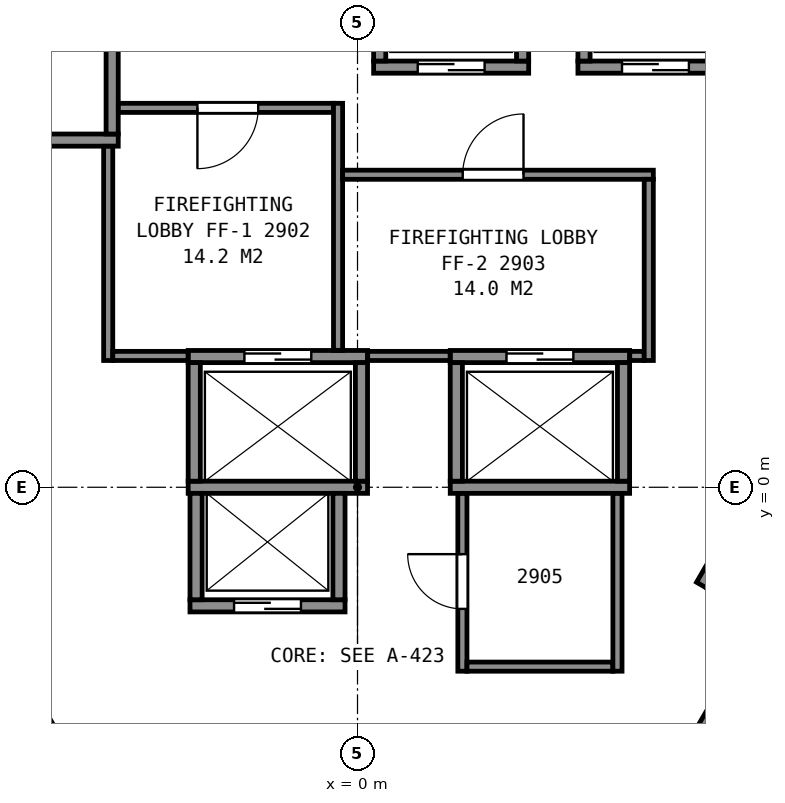
"""IFC4 building model, lengths in metres.
Left out: names, types, materials, properties, quantities, classifications, styles, units other than length and angle.
Written with IfcOpenShell. Run it as: python <this file> out.ifc"""

import sys

from ifc_helpers import new_model, si_unit, direction, frame, frame_2d, origin, place, context, subcontext, project, spatial, rectangle, extrude, element, fill, save


model = new_model("IFC4")
c1 = context("Model", 3, precision=1e-05, world=origin(), true_north=direction((0.0, 1.0)))
c2 = subcontext(c1, "Body", "Model", "MODEL_VIEW")
j1 = project(units=[si_unit("LENGTHUNIT", "METRE"), si_unit("PLANEANGLEUNIT", "RADIAN")], contexts=[c1])
p1 = place(None, origin())
s1 = spatial("IfcSite", under=j1, at=p1, CompositionType="ELEMENT")
p2 = place(p1, origin())
s2 = spatial("IfcBuilding", under=s1, at=p2, CompositionType="ELEMENT")
p3 = place(p2, frame((0.0, 0.0, 121.6)))
s3 = spatial("IfcBuildingStorey", under=s2, at=p3, CompositionType="ELEMENT", Elevation=121.6)
p4 = place(p3, frame((-2.755, -1.95, 0.0), z_axis=(0.0, 0.0, 1.0), x_axis=(1.0, 0.0, 0.0)))
e1 = element("IfcWall", 1, at=p4, inside=s3, PredefinedType="PARTITIONING", context=c2, shape_type="SweptSolid", body=[
    extrude(rectangle(XDim=2.55, YDim=0.2, at=frame_2d((1.275, 0.0))), origin(), (0.0, 0.0, 1.0), 3.6),
])
p5 = place(p4, frame((0.725, 0.0, 0.0)))
e2 = element("IfcOpeningElement", 2, at=p5, cuts=e1, PredefinedType="OPENING", context=c2, shape_type="SweptSolid", body=[
    extrude(rectangle(XDim=1.1, YDim=2.1, at=frame_2d((0.55, 1.05))), frame((0.0, 0.11, 0.0), z_axis=(0.0, -1.0, 0.0), x_axis=(1.0, 0.0, 0.0)), (0.0, 0.0, 1.0), 0.22),
])
p6 = place(p3, frame((-2.785, 0.0, 0.0), z_axis=(0.0, 0.0, 1.0), x_axis=(1.0, 0.0, 0.0)))
e3 = element("IfcWall", 3, at=p6, inside=s3, PredefinedType="PARTITIONING", context=c2, shape_type="SweptSolid", body=[
    extrude(rectangle(XDim=2.95, YDim=0.2, at=frame_2d((1.475, 0.0))), origin(), (0.0, 0.0, 1.0), 3.6),
])
p7 = place(p3, frame((1.525, 0.0, 0.0), z_axis=(0.0, 0.0, 1.0), x_axis=(1.0, 0.0, 0.0)))
e4 = element("IfcWall", 4, at=p7, inside=s3, PredefinedType="PARTITIONING", context=c2, shape_type="SweptSolid", body=[
    extrude(rectangle(XDim=2.95, YDim=0.2, at=frame_2d((1.475, 0.0))), origin(), (0.0, 0.0, 1.0), 3.6),
])
p8 = place(p3, frame((-2.785, 2.15, 0.0), z_axis=(0.0, 0.0, 1.0), x_axis=(1.0, 0.0, 0.0)))
e5 = element("IfcWall", 5, at=p8, inside=s3, PredefinedType="PARTITIONING", context=c2, shape_type="SweptSolid", body=[
    extrude(rectangle(XDim=2.95, YDim=0.2, at=frame_2d((1.475, 0.0))), origin(), (0.0, 0.0, 1.0), 3.6),
])
p9 = place(p8, frame((0.925, 0.0, 0.0)))
e6 = element("IfcOpeningElement", 6, at=p9, cuts=e5, PredefinedType="OPENING", context=c2, shape_type="SweptSolid", body=[
    extrude(rectangle(XDim=1.1, YDim=2.1, at=frame_2d((0.55, 1.05))), frame((0.0, 0.11, 0.0), z_axis=(0.0, -1.0, 0.0), x_axis=(1.0, 0.0, 0.0)), (0.0, 0.0, 1.0), 0.22),
])
p10 = place(p3, frame((1.525, 2.15, 0.0), z_axis=(0.0, 0.0, 1.0), x_axis=(1.0, 0.0, 0.0)))
e7 = element("IfcWall", 7, at=p10, inside=s3, PredefinedType="PARTITIONING", context=c2, shape_type="SweptSolid", body=[
    extrude(rectangle(XDim=2.95, YDim=0.2, at=frame_2d((1.475, 0.0))), origin(), (0.0, 0.0, 1.0), 3.6),
])
p11 = place(p10, frame((0.925, 0.0, 0.0)))
e8 = element("IfcOpeningElement", 8, at=p11, cuts=e7, PredefinedType="OPENING", context=c2, shape_type="SweptSolid", body=[
    extrude(rectangle(XDim=1.1, YDim=2.1, at=frame_2d((0.55, 1.05))), frame((0.0, 0.11, 0.0), z_axis=(0.0, -1.0, 0.0), x_axis=(1.0, 0.0, 0.0)), (0.0, 0.0, 1.0), 0.22),
])
p12 = place(p3, frame((-6.285, 5.71, 0.0), z_axis=(0.0, 0.0, 1.0), x_axis=(1.0, 0.0, 0.0)))
e9 = element("IfcWall", 9, at=p12, inside=s3, PredefinedType="PARTITIONING", context=c2, shape_type="SweptSolid", body=[
    extrude(rectangle(XDim=2.35, YDim=0.2, at=frame_2d((1.175, 0.0))), origin(), (0.0, 0.0, 1.0), 3.6),
])
p13 = place(p3, frame((0.265, 6.91, 0.0), z_axis=(0.0, 0.0, 1.0), x_axis=(1.0, 0.0, 0.0)))
e10 = element("IfcWall", 10, at=p13, inside=s3, PredefinedType="PARTITIONING", context=c2, shape_type="SweptSolid", body=[
    extrude(rectangle(XDim=2.55, YDim=0.2, at=frame_2d((1.275, 0.0))), origin(), (0.0, 0.0, 1.0), 3.6),
])
p14 = place(p13, frame((0.725, 0.0, 0.0)))
e11 = element("IfcOpeningElement", 11, at=p14, cuts=e10, PredefinedType="OPENING", context=c2, shape_type="SweptSolid", body=[
    extrude(rectangle(XDim=1.1, YDim=2.1, at=frame_2d((0.55, 1.05))), frame((0.0, 0.11, 0.0), z_axis=(0.0, -1.0, 0.0), x_axis=(1.0, 0.0, 0.0)), (0.0, 0.0, 1.0), 0.22),
])
p15 = place(p3, frame((3.625, 6.91, 0.0), z_axis=(0.0, 0.0, 1.0), x_axis=(1.0, 0.0, 0.0)))
e12 = element("IfcWall", 12, at=p15, inside=s3, PredefinedType="PARTITIONING", context=c2, shape_type="SweptSolid", body=[
    extrude(rectangle(XDim=2.55, YDim=0.2, at=frame_2d((1.275, 0.0))), origin(), (0.0, 0.0, 1.0), 3.6),
])
p16 = place(p15, frame((0.725, 0.0, 0.0)))
e13 = element("IfcOpeningElement", 13, at=p16, cuts=e12, PredefinedType="OPENING", context=c2, shape_type="SweptSolid", body=[
    extrude(rectangle(XDim=1.1, YDim=2.1, at=frame_2d((0.55, 1.05))), frame((0.0, 0.11, 0.0), z_axis=(0.0, -1.0, 0.0), x_axis=(1.0, 0.0, 0.0)), (0.0, 0.0, 1.0), 0.22),
])
p17 = place(p3, frame((5.527, -4.247, 0.0), z_axis=(0.0, 0.0, 1.0), x_axis=(0.499938297808, 0.866061024631, 0.0)))
e14 = element("IfcWall", 14, at=p17, inside=s3, PredefinedType="PARTITIONING", context=c2, shape_type="SweptSolid", body=[
    extrude(rectangle(XDim=2.35, YDim=0.2, at=frame_2d((1.175, 0.0))), origin(), (0.0, 0.0, 1.0), 3.6),
])
p18 = place(p17, frame((0.725, 0.0, 0.0)))
e15 = element("IfcOpeningElement", 15, at=p18, cuts=e14, PredefinedType="OPENING", context=c2, shape_type="SweptSolid", body=[
    extrude(rectangle(XDim=1.1, YDim=2.1, at=frame_2d((0.55, 1.05))), frame((0.0, 0.11, 0.0), z_axis=(0.0, -1.0, 0.0), x_axis=(1.0, 0.0, 0.0)), (0.0, 0.0, 1.0), 0.22),
])
p19 = place(p3, frame((5.663, -1.612, 0.0), z_axis=(0.0, 0.0, 1.0), x_axis=(0.49998122708, 0.866036242063, 0.0)))
e16 = element("IfcWall", 16, at=p19, inside=s3, PredefinedType="PARTITIONING", context=c2, shape_type="SweptSolid", body=[
    extrude(rectangle(XDim=4.9, YDim=0.2, at=frame_2d((2.45, 0.0))), origin(), (0.0, 0.0, 1.0), 3.6),
])
p20 = place(p3, frame((4.375, 0.1, 0.0), z_axis=(0.0, 0.0, 1.0), x_axis=(0.0, 1.0, 0.0)))
e17 = element("IfcWall", 17, at=p20, inside=s3, PredefinedType="PARTITIONING", context=c2, shape_type="SweptSolid", body=[
    extrude(rectangle(XDim=1.95, YDim=0.2, at=frame_2d((0.975, 0.0))), origin(), (0.0, 0.0, 1.0), 3.6),
])
for number, where, z_axis, x_axis in (
    (18, (3.725, 7.01, 0.0), (0.0, 0.0, 1.0), (0.0, 1.0, 0.0)),
    (19, (2.715, 7.01, 0.0), (0.0, 0.0, 1.0), (0.0, 1.0, 0.0)),
):
    element("IfcWall", number, at=place(p3, frame(where, z_axis=z_axis, x_axis=x_axis)), inside=s3, PredefinedType="PARTITIONING", context=c2, shape_type="SweptSolid", body=[
        extrude(rectangle(XDim=1.75, YDim=0.2, at=frame_2d((0.875, 0.0))), origin(), (0.0, 0.0, 1.0), 3.6),
    ])
p21 = place(p3, frame((1.625, 0.1, 0.0), z_axis=(0.0, 0.0, 1.0), x_axis=(0.0, 1.0, 0.0)))
e20 = element("IfcWall", 20, at=p21, inside=s3, PredefinedType="PARTITIONING", context=c2, shape_type="SweptSolid", body=[
    extrude(rectangle(XDim=1.95, YDim=0.2, at=frame_2d((0.975, 0.0))), origin(), (0.0, 0.0, 1.0), 3.6),
])
p22 = place(p3, frame((0.365, 7.01, 0.0), z_axis=(0.0, 0.0, 1.0), x_axis=(0.0, 1.0, 0.0)))
e21 = element("IfcWall", 21, at=p22, inside=s3, PredefinedType="PARTITIONING", context=c2, shape_type="SweptSolid", body=[
    extrude(rectangle(XDim=1.75, YDim=0.2, at=frame_2d((0.875, 0.0))), origin(), (0.0, 0.0, 1.0), 3.6),
])
p23 = place(p3, frame((0.065, 0.1, 0.0), z_axis=(0.0, 0.0, 1.0), x_axis=(0.0, 1.0, 0.0)))
e22 = element("IfcWall", 22, at=p23, inside=s3, PredefinedType="PARTITIONING", context=c2, shape_type="SweptSolid", body=[
    extrude(rectangle(XDim=1.95, YDim=0.2, at=frame_2d((0.975, 0.0))), origin(), (0.0, 0.0, 1.0), 3.6),
])
for number, where, z_axis, x_axis in (
    (23, (-0.305, -1.85, 0.0), (0.0, 0.0, 1.0), (0.0, 1.0, 0.0)),
    (24, (-2.655, -1.85, 0.0), (0.0, 0.0, 1.0), (0.0, 1.0, 0.0)),
):
    element("IfcWall", number, at=place(p3, frame(where, z_axis=z_axis, x_axis=x_axis)), inside=s3, PredefinedType="PARTITIONING", context=c2, shape_type="SweptSolid", body=[
        extrude(rectangle(XDim=1.75, YDim=0.2, at=frame_2d((0.875, 0.0))), origin(), (0.0, 0.0, 1.0), 3.6),
    ])
p24 = place(p3, frame((-2.685, 0.1, 0.0), z_axis=(0.0, 0.0, 1.0), x_axis=(0.0, 1.0, 0.0)))
e25 = element("IfcWall", 25, at=p24, inside=s3, PredefinedType="PARTITIONING", context=c2, shape_type="SweptSolid", body=[
    extrude(rectangle(XDim=1.95, YDim=0.2, at=frame_2d((0.975, 0.0))), origin(), (0.0, 0.0, 1.0), 3.6),
])
p25 = place(p3, frame((-4.035, 5.81, 0.0), z_axis=(0.0, 0.0, 1.0), x_axis=(0.0, 1.0, 0.0)))
e26 = element("IfcWall", 26, at=p25, inside=s3, PredefinedType="PARTITIONING", context=c2, shape_type="SweptSolid", body=[
    extrude(rectangle(XDim=1.75, YDim=0.2, at=frame_2d((0.875, 0.0))), origin(), (0.0, 0.0, 1.0), 3.6),
])
p26 = place(p3, frame((-13.664, 5.946, 0.0), z_axis=(0.0, 0.0, 1.0), x_axis=(0.499994327219, -0.866028678941, 0.0)))
e27 = element("IfcWall", 27, at=p26, inside=s3, PredefinedType="PARTITIONING", context=c2, shape_type="SweptSolid", body=[
    extrude(rectangle(XDim=23.968, YDim=0.2, at=frame_2d((11.984, 0.0))), origin(), (0.0, 0.0, 1.0), 3.35),
])
p27 = place(p3, frame((-4.091, -5.635, 0.0), z_axis=(0.0, 0.0, 1.0), x_axis=(-0.499948934428, 0.866054884499, 0.0)))
e28 = element("IfcWall", 28, at=p27, inside=s3, PredefinedType="PARTITIONING", context=c2, shape_type="SweptSolid", body=[
    extrude(rectangle(XDim=3.577, YDim=0.15, at=frame_2d((1.789, 0.0))), origin(), (0.0, 0.0, 1.0), 3.35),
])
p28 = place(p27, frame((2.377, 0.0, 0.0)))
e29 = element("IfcOpeningElement", 29, at=p28, cuts=e28, PredefinedType="OPENING", context=c2, shape_type="SweptSolid", body=[
    extrude(rectangle(XDim=0.9, YDim=2.1, at=frame_2d((0.45, 1.05))), frame((0.0, 0.085, 0.0), z_axis=(0.0, -1.0, 0.0), x_axis=(1.0, 0.0, 0.0)), (0.0, 0.0, 1.0), 0.17),
])
p29 = place(p27, frame((0.605, 0.0, 0.0)))
e30 = element("IfcOpeningElement", 30, at=p29, cuts=e28, PredefinedType="OPENING", context=c2, shape_type="SweptSolid", body=[
    extrude(rectangle(XDim=0.9, YDim=2.1, at=frame_2d((0.45, 1.05))), frame((0.0, 0.085, 0.0), z_axis=(0.0, -1.0, 0.0), x_axis=(1.0, 0.0, 0.0)), (0.0, 0.0, 1.0), 0.17),
])
p30 = place(p3, frame((-4.1, 2.085, 0.0), z_axis=(0.0, 0.0, 1.0), x_axis=(0.0, 1.0, 0.0)))
e31 = element("IfcWall", 31, at=p30, inside=s3, PredefinedType="PARTITIONING", context=c2, shape_type="SweptSolid", body=[
    extrude(rectangle(XDim=3.523, YDim=0.15, at=frame_2d((1.761, 0.0))), origin(), (0.0, 0.0, 1.0), 3.35),
])
p31 = place(p3, frame((-4.025, 2.16, 0.0), z_axis=(0.0, 0.0, 1.0), x_axis=(1.0, 0.0, 0.0)))
e32 = element("IfcWall", 32, at=p31, inside=s3, PredefinedType="PARTITIONING", context=c2, shape_type="SweptSolid", body=[
    extrude(rectangle(XDim=1.238, YDim=0.15, at=frame_2d((0.619, 0.0))), origin(), (0.0, 0.0, 1.0), 3.35),
])
p32 = place(p3, frame((-3.933, 6.24, 0.0), z_axis=(0.0, 0.0, 1.0), x_axis=(1.0, 0.0, 0.0)))
e33 = element("IfcWall", 33, at=p32, inside=s3, PredefinedType="PARTITIONING", context=c2, shape_type="SweptSolid", body=[
    extrude(rectangle(XDim=3.538, YDim=0.15, at=frame_2d((1.769, 0.0))), origin(), (0.0, 0.0, 1.0), 3.35),
])
p33 = place(p32, frame((1.3, 0.0, 0.0)))
e34 = element("IfcOpeningElement", 34, at=p33, cuts=e33, PredefinedType="OPENING", context=c2, shape_type="SweptSolid", body=[
    extrude(rectangle(XDim=1.0, YDim=2.1, at=frame_2d((0.5, 1.05))), frame((0.0, 0.085, 0.0), z_axis=(0.0, -1.0, 0.0), x_axis=(1.0, 0.0, 0.0)), (0.0, 0.0, 1.0), 0.17),
])
p34 = place(p3, frame((-0.32, 2.252, 0.0), z_axis=(0.0, 0.0, 1.0), x_axis=(0.0, 1.0, 0.0)))
e35 = element("IfcWall", 35, at=p34, inside=s3, PredefinedType="PARTITIONING", context=c2, shape_type="SweptSolid", body=[
    extrude(rectangle(XDim=4.063, YDim=0.15, at=frame_2d((2.031, 0.0))), origin(), (0.0, 0.0, 1.0), 3.35),
])
p35 = place(p3, frame((-0.245, 5.14, 0.0), z_axis=(0.0, 0.0, 1.0), x_axis=(1.0, 0.0, 0.0)))
e36 = element("IfcWall", 36, at=p35, inside=s3, PredefinedType="PARTITIONING", context=c2, shape_type="SweptSolid", body=[
    extrude(rectangle(XDim=5.11, YDim=0.15, at=frame_2d((2.555, 0.0))), origin(), (0.0, 0.0, 1.0), 3.35),
])
p36 = place(p35, frame((1.975, 0.0, 0.0)))
e37 = element("IfcOpeningElement", 37, at=p36, cuts=e36, PredefinedType="OPENING", context=c2, shape_type="SweptSolid", body=[
    extrude(rectangle(XDim=1.0, YDim=2.1, at=frame_2d((0.5, 1.05))), frame((0.0, 0.085, 0.0), z_axis=(0.0, -1.0, 0.0), x_axis=(1.0, 0.0, 0.0)), (0.0, 0.0, 1.0), 0.17),
])
p37 = place(p3, frame((0.167, 2.16, 0.0), z_axis=(0.0, 0.0, 1.0), x_axis=(1.0, 0.0, 0.0)))
e38 = element("IfcWall", 38, at=p37, inside=s3, PredefinedType="PARTITIONING", context=c2, shape_type="SweptSolid", body=[
    extrude(rectangle(XDim=1.356, YDim=0.15, at=frame_2d((0.678, 0.0))), origin(), (0.0, 0.0, 1.0), 3.35),
])
p38 = place(p3, frame((1.725, -0.102, 0.0), z_axis=(0.0, 0.0, 1.0), x_axis=(0.0, -1.0, 0.0)))
e39 = element("IfcWall", 39, at=p38, inside=s3, PredefinedType="PARTITIONING", context=c2, shape_type="SweptSolid", body=[
    extrude(rectangle(XDim=2.923, YDim=0.15, at=frame_2d((1.461, 0.0))), origin(), (0.0, 0.0, 1.0), 3.35),
])
p39 = place(p38, frame((0.998, 0.0, 0.0)))
e40 = element("IfcOpeningElement", 40, at=p39, cuts=e39, PredefinedType="OPENING", context=c2, shape_type="SweptSolid", body=[
    extrude(rectangle(XDim=0.9, YDim=2.1, at=frame_2d((0.45, 1.05))), frame((0.0, 0.085, 0.0), z_axis=(0.0, -1.0, 0.0), x_axis=(1.0, 0.0, 0.0)), (0.0, 0.0, 1.0), 0.17),
])
p40 = place(p3, frame((1.8, -2.95, 0.0), z_axis=(0.0, 0.0, 1.0), x_axis=(1.0, 0.0, 0.0)))
e41 = element("IfcWall", 41, at=p40, inside=s3, PredefinedType="PARTITIONING", context=c2, shape_type="SweptSolid", body=[
    extrude(rectangle(XDim=2.4, YDim=0.15, at=frame_2d((1.2, 0.0))), origin(), (0.0, 0.0, 1.0), 3.35),
])
p41 = place(p3, frame((4.275, -3.025, 0.0), z_axis=(0.0, 0.0, 1.0), x_axis=(0.0, 1.0, 0.0)))
e42 = element("IfcWall", 42, at=p41, inside=s3, PredefinedType="PARTITIONING", context=c2, shape_type="SweptSolid", body=[
    extrude(rectangle(XDim=2.923, YDim=0.15, at=frame_2d((1.461, 0.0))), origin(), (0.0, 0.0, 1.0), 3.35),
])
p42 = place(p3, frame((4.477, 2.16, 0.0), z_axis=(0.0, 0.0, 1.0), x_axis=(1.0, 0.0, 0.0)))
e43 = element("IfcWall", 43, at=p42, inside=s3, PredefinedType="PARTITIONING", context=c2, shape_type="SweptSolid", body=[
    extrude(rectangle(XDim=0.238, YDim=0.15, at=frame_2d((0.119, 0.0))), origin(), (0.0, 0.0, 1.0), 3.35),
])
p43 = place(p3, frame((4.79, 2.085, 0.0), z_axis=(0.0, 0.0, 1.0), x_axis=(0.0, 1.0, 0.0)))
e44 = element("IfcWall", 44, at=p43, inside=s3, PredefinedType="PARTITIONING", context=c2, shape_type="SweptSolid", body=[
    extrude(rectangle(XDim=2.98, YDim=0.15, at=frame_2d((1.49, 0.0))), origin(), (0.0, 0.0, 1.0), 3.35),
])
p44 = place(p3, frame((-3.756, -15.494, 0.0), z_axis=(0.0, 0.0, 1.0), x_axis=(-0.500027787016, 0.866009360349, 0.0)))
e45 = element("IfcWall", 45, at=p44, inside=s3, PredefinedType="PARTITIONING", context=c2, shape_type="SweptSolid", body=[
    extrude(rectangle(XDim=23.856, YDim=0.125, at=frame_2d((11.928, 0.0))), origin(), (0.0, 0.0, 1.0), 2.613),
])
p45 = place(p44, frame((10.016, 0.0, 0.0)))
e46 = element("IfcOpeningElement", 46, at=p45, cuts=e45, PredefinedType="OPENING", context=c2, shape_type="SweptSolid", body=[
    extrude(rectangle(XDim=1.0, YDim=2.1, at=frame_2d((0.5, 1.05))), frame((0.0, 0.073, 0.0), z_axis=(0.0, -1.0, 0.0), x_axis=(1.0, 0.0, 0.0)), (0.0, 0.0, 1.0), 0.145),
])
p46 = place(p44, frame((6.402, 0.0, 0.0)))
e47 = element("IfcOpeningElement", 47, at=p46, cuts=e45, PredefinedType="OPENING", context=c2, shape_type="SweptSolid", body=[
    extrude(rectangle(XDim=0.9, YDim=2.1, at=frame_2d((0.45, 1.05))), frame((0.0, 0.073, 0.0), z_axis=(0.0, -1.0, 0.0), x_axis=(1.0, 0.0, 0.0)), (0.0, 0.0, 1.0), 0.145),
])
p47 = place(p3, frame((15.684, 5.165, 0.0), z_axis=(0.0, 0.0, 1.0), x_axis=(-0.500027787016, -0.866009360349, 0.0)))
e48 = element("IfcWall", 48, at=p47, inside=s3, PredefinedType="PARTITIONING", context=c2, shape_type="SweptSolid", body=[
    extrude(rectangle(XDim=23.856, YDim=0.125, at=frame_2d((11.928, 0.0))), origin(), (0.0, 0.0, 1.0), 2.613),
])
p48 = place(p47, frame((21.493, 0.0, 0.0)))
e49 = element("IfcOpeningElement", 49, at=p48, cuts=e48, PredefinedType="OPENING", context=c2, shape_type="SweptSolid", body=[
    extrude(rectangle(XDim=1.0, YDim=2.1, at=frame_2d((0.5, 1.05))), frame((0.0, 0.073, 0.0), z_axis=(0.0, -1.0, 0.0), x_axis=(1.0, 0.0, 0.0)), (0.0, 0.0, 1.0), 0.145),
])
p49 = place(p47, frame((10.853, 0.0, 0.0)))
e50 = element("IfcOpeningElement", 50, at=p49, cuts=e48, PredefinedType="OPENING", context=c2, shape_type="SweptSolid", body=[
    extrude(rectangle(XDim=0.9, YDim=2.1, at=frame_2d((0.45, 1.05))), frame((0.0, 0.073, 0.0), z_axis=(0.0, -1.0, 0.0), x_axis=(1.0, 0.0, 0.0)), (0.0, 0.0, 1.0), 0.145),
])
p50 = place(p47, frame((6.558, 0.0, 0.0)))
e51 = element("IfcOpeningElement", 51, at=p50, cuts=e48, PredefinedType="OPENING", context=c2, shape_type="SweptSolid", body=[
    extrude(rectangle(XDim=1.0, YDim=2.1, at=frame_2d((0.5, 1.05))), frame((0.0, 0.073, 0.0), z_axis=(0.0, -1.0, 0.0), x_axis=(1.0, 0.0, 0.0)), (0.0, 0.0, 1.0), 0.145),
])
p51 = place(p14, origin())
e52 = element("IfcDoor", 52, at=p51, inside=s3, OperationType="SLIDING_TO_LEFT", PredefinedType="DOOR", context=c2, shape_type="SweptSolid", body=[
    extrude(rectangle(XDim=1.1, YDim=2.1, at=frame_2d((0.55, 1.05))), frame((0.0, 0.025, 0.0), z_axis=(0.0, -1.0, 0.0), x_axis=(1.0, 0.0, 0.0)), (0.0, 0.0, 1.0), 0.05),
])
fill(e11, e52)
p52 = place(p5, origin())
e53 = element("IfcDoor", 53, at=p52, inside=s3, OperationType="SLIDING_TO_RIGHT", PredefinedType="DOOR", context=c2, shape_type="SweptSolid", body=[
    extrude(rectangle(XDim=1.1, YDim=2.1, at=frame_2d((0.55, 1.05))), frame((0.0, 0.025, 0.0), z_axis=(0.0, -1.0, 0.0), x_axis=(1.0, 0.0, 0.0)), (0.0, 0.0, 1.0), 0.05),
])
fill(e2, e53)
p53 = place(p16, origin())
e54 = element("IfcDoor", 54, at=p53, inside=s3, OperationType="SLIDING_TO_LEFT", PredefinedType="DOOR", context=c2, shape_type="SweptSolid", body=[
    extrude(rectangle(XDim=1.1, YDim=2.1, at=frame_2d((0.55, 1.05))), frame((0.0, 0.025, 0.0), z_axis=(0.0, -1.0, 0.0), x_axis=(1.0, 0.0, 0.0)), (0.0, 0.0, 1.0), 0.05),
])
fill(e13, e54)
p54 = place(p9, origin())
e55 = element("IfcDoor", 55, at=p54, inside=s3, OperationType="SLIDING_TO_LEFT", PredefinedType="DOOR", context=c2, shape_type="SweptSolid", body=[
    extrude(rectangle(XDim=1.1, YDim=2.1, at=frame_2d((0.55, 1.05))), frame((0.0, 0.025, 0.0), z_axis=(0.0, -1.0, 0.0), x_axis=(1.0, 0.0, 0.0)), (0.0, 0.0, 1.0), 0.05),
])
fill(e6, e55)
p55 = place(p11, origin())
e56 = element("IfcDoor", 56, at=p55, inside=s3, OperationType="SLIDING_TO_RIGHT", PredefinedType="DOOR", context=c2, shape_type="SweptSolid", body=[
    extrude(rectangle(XDim=1.1, YDim=2.1, at=frame_2d((0.55, 1.05))), frame((0.0, 0.025, 0.0), z_axis=(0.0, -1.0, 0.0), x_axis=(1.0, 0.0, 0.0)), (0.0, 0.0, 1.0), 0.05),
])
fill(e8, e56)
p56 = place(p33, origin())
e57 = element("IfcDoor", 57, at=p56, inside=s3, OperationType="SINGLE_SWING_LEFT", PredefinedType="DOOR", context=c2, shape_type="SweptSolid", body=[
    extrude(rectangle(XDim=1.0, YDim=2.1, at=frame_2d((0.5, 1.05))), frame((0.0, 0.025, 0.0), z_axis=(0.0, -1.0, 0.0), x_axis=(1.0, 0.0, 0.0)), (0.0, 0.0, 1.0), 0.05),
])
fill(e34, e57)
p57 = place(p36, origin())
e58 = element("IfcDoor", 58, at=p57, inside=s3, OperationType="SINGLE_SWING_RIGHT", PredefinedType="DOOR", context=c2, shape_type="SweptSolid", body=[
    extrude(rectangle(XDim=1.0, YDim=2.1, at=frame_2d((0.5, 1.05))), frame((0.0, 0.025, 0.0), z_axis=(0.0, -1.0, 0.0), x_axis=(1.0, 0.0, 0.0)), (0.0, 0.0, 1.0), 0.05),
])
fill(e37, e58)
p58 = place(p39, origin())
e59 = element("IfcDoor", 59, at=p58, inside=s3, OperationType="SINGLE_SWING_LEFT", PredefinedType="DOOR", context=c2, shape_type="SweptSolid", body=[
    extrude(rectangle(XDim=0.9, YDim=2.1, at=frame_2d((0.45, 1.05))), frame((0.0, 0.025, 0.0), z_axis=(0.0, -1.0, 0.0), x_axis=(1.0, 0.0, 0.0)), (0.0, 0.0, 1.0), 0.05),
])
fill(e40, e59)
save(model, sys.argv[1])
